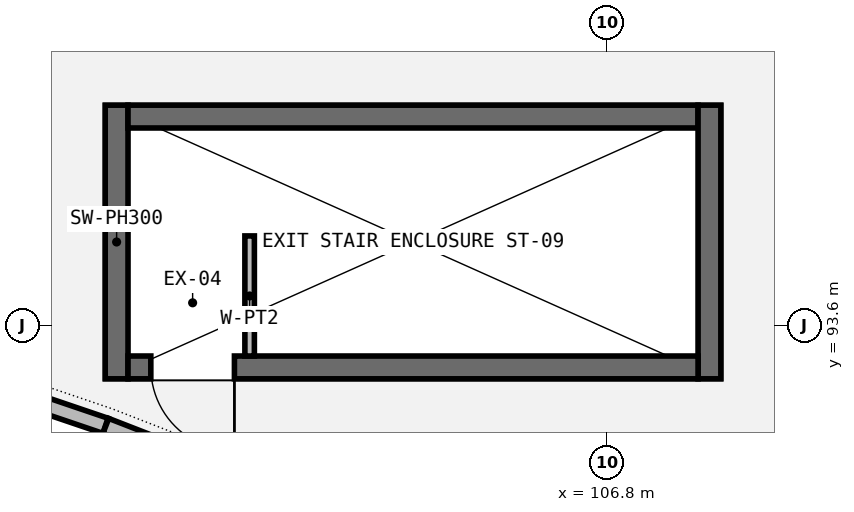
"""IFC4 building model, lengths in metres.
Left out: names, types, materials, properties, quantities, classifications, styles, units other than length and angle.
Written with IfcOpenShell. Run it as: python <this file> out.ifc"""

import sys

from ifc_helpers import new_model, si_unit, direction, frame, frame_2d, origin, place, context, subcontext, project, spatial, rectangle, extrude, element, fill, save


model = new_model("IFC4")
c1 = context("Model", 3, precision=1e-05, world=origin(), true_north=direction((0.0, 1.0)))
c2 = subcontext(c1, "Body", "Model", "MODEL_VIEW")
j1 = project(units=[si_unit("LENGTHUNIT", "METRE"), si_unit("PLANEANGLEUNIT", "RADIAN")], contexts=[c1])
p1 = place(None, origin())
s1 = spatial("IfcSite", under=j1, at=p1, CompositionType="ELEMENT")
p2 = place(p1, origin())
s2 = spatial("IfcBuilding", under=s1, at=p2, CompositionType="ELEMENT")
p3 = place(p2, frame((0.0, 0.0, 23.45)))
s3 = spatial("IfcBuildingStorey", under=s2, at=p3, CompositionType="ELEMENT", Elevation=23.45)
p4 = place(p3, frame((100.35, 92.9, 0.0), z_axis=(0.0, 0.0, 1.0), x_axis=(0.0, 1.0, 0.0)))
e1 = element("IfcWall", 1, at=p4, inside=s3, PredefinedType="SHEAR", context=c2, shape_type="SweptSolid", body=[
    extrude(rectangle(XDim=3.6, YDim=0.3, at=frame_2d((1.8, 0.0))), origin(), (0.0, 0.0, 1.0), 3.2),
])
p5 = place(p3, frame((100.5, 96.35, 0.0), z_axis=(0.0, 0.0, 1.0), x_axis=(1.0, 0.0, 0.0)))
e2 = element("IfcWall", 2, at=p5, inside=s3, PredefinedType="SHEAR", context=c2, shape_type="SweptSolid", body=[
    extrude(rectangle(XDim=7.5, YDim=0.3, at=frame_2d((3.75, 0.0))), origin(), (0.0, 0.0, 1.0), 3.2),
])
p6 = place(p3, frame((108.15, 96.5, 0.0), z_axis=(0.0, 0.0, 1.0), x_axis=(0.0, -1.0, 0.0)))
e3 = element("IfcWall", 3, at=p6, inside=s3, PredefinedType="SHEAR", context=c2, shape_type="SweptSolid", body=[
    extrude(rectangle(XDim=3.6, YDim=0.3, at=frame_2d((1.8, 0.0))), origin(), (0.0, 0.0, 1.0), 3.2),
])
p7 = place(p3, frame((108.0, 93.05, 0.0), z_axis=(0.0, 0.0, 1.0), x_axis=(-1.0, 0.0, 0.0)))
e4 = element("IfcWall", 4, at=p7, inside=s3, PredefinedType="SHEAR", context=c2, shape_type="SweptSolid", body=[
    extrude(rectangle(XDim=7.5, YDim=0.3, at=frame_2d((3.75, 0.0))), origin(), (0.0, 0.0, 1.0), 3.2),
])
p8 = place(p7, frame((6.1, 0.0, 0.0)))
e5 = element("IfcOpeningElement", 5, at=p8, cuts=e4, PredefinedType="OPENING", context=c2, shape_type="SweptSolid", body=[
    extrude(rectangle(XDim=1.1, YDim=2.15, at=frame_2d((0.55, 1.075))), frame((0.0, 0.16, 0.0), z_axis=(0.0, -1.0, 0.0), x_axis=(1.0, 0.0, 0.0)), (0.0, 0.0, 1.0), 0.32),
])
p9 = place(p3, frame((98.612, 92.822, 0.0), z_axis=(0.0, 0.0, 1.0), x_axis=(0.946924996106, -0.321454587383, 0.0)))
e6 = element("IfcWall", 6, at=p9, inside=s3, PredefinedType="PARAPET", context=c2, shape_type="SweptSolid", body=[
    extrude(rectangle(XDim=1.68, YDim=0.21, at=frame_2d((0.84, 0.0))), origin(), (0.0, 0.0, 1.0), 1.2),
])
p10 = place(p3, frame((100.208, 92.281, 0.0), z_axis=(0.0, 0.0, 1.0), x_axis=(0.931944632128, -0.362600610379, 0.0)))
e7 = element("IfcWall", 7, at=p10, inside=s3, PredefinedType="PARAPET", context=c2, shape_type="SweptSolid", body=[
    extrude(rectangle(XDim=1.679, YDim=0.21, at=frame_2d((0.84, 0.0))), origin(), (0.0, 0.0, 1.0), 1.2),
])
p11 = place(p3, frame((102.1, 93.2, 0.0), z_axis=(0.0, 0.0, 1.0), x_axis=(0.0, 1.0, 0.0)))
e8 = element("IfcWall", 8, at=p11, inside=s3, PredefinedType="PARTITIONING", context=c2, shape_type="SweptSolid", body=[
    extrude(rectangle(XDim=1.58, YDim=0.125, at=frame_2d((0.79, 0.0))), origin(), (0.0, 0.0, 1.0), 1.15),
])
p12 = place(p8, origin())
e9 = element("IfcDoor", 9, at=p12, inside=s3, OperationType="SINGLE_SWING_LEFT", PredefinedType="DOOR", context=c2, shape_type="SweptSolid", body=[
    extrude(rectangle(XDim=1.1, YDim=2.15, at=frame_2d((0.55, 1.075))), frame((0.0, 0.025, 0.0), z_axis=(0.0, -1.0, 0.0), x_axis=(1.0, 0.0, 0.0)), (0.0, 0.0, 1.0), 0.05),
])
fill(e5, e9)
save(model, sys.argv[1])
